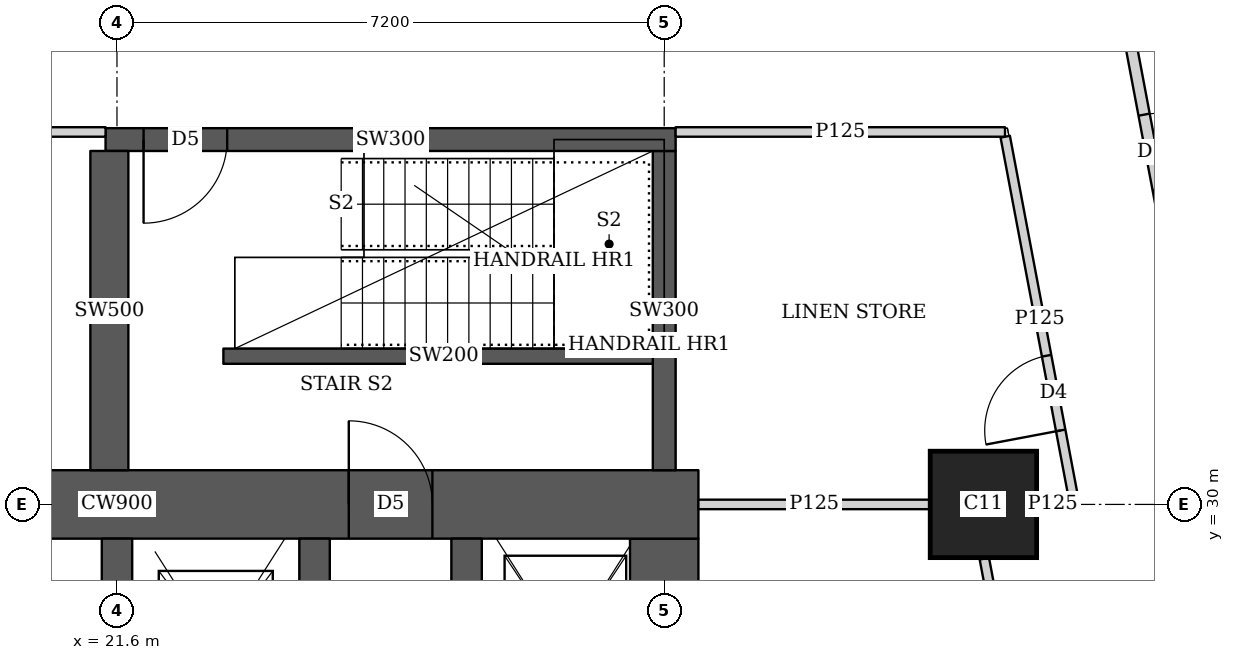
"""IFC4 building model, lengths in metres.
Left out: names, types, materials, properties, quantities, classifications, styles, units other than length and angle.
Written with IfcOpenShell. Run it as: python <this file> out.ifc"""

import sys

from ifc_helpers import new_model, si_unit, direction, frame, frame_2d, origin, origin_2d, place, context, subcontext, project, spatial, rectangle, extrude, element, fill, save


model = new_model("IFC4")
c1 = context("Model", 3, precision=1e-05, world=origin(), true_north=direction((0.0, 1.0)))
c2 = subcontext(c1, "Body", "Model", "MODEL_VIEW")
j1 = project(units=[si_unit("LENGTHUNIT", "METRE"), si_unit("PLANEANGLEUNIT", "RADIAN")], contexts=[c1])
p1 = place(None, origin())
s1 = spatial("IfcSite", under=j1, at=p1, CompositionType="ELEMENT")
p2 = place(p1, origin())
s2 = spatial("IfcBuilding", under=s1, at=p2, CompositionType="ELEMENT")
p3 = place(p2, frame((0.0, 0.0, 251.6)))
s3 = spatial("IfcBuildingStorey", under=s2, at=p3, CompositionType="ELEMENT", Elevation=251.6)
p4 = place(p3, frame((33.0, 30.0, 0.0), z_axis=(0.0, 0.0, 1.0), x_axis=(1.0, 0.0, 0.0)))
e1 = element("IfcColumn", 1, at=p4, inside=s3, PredefinedType="COLUMN", context=c2, shape_type="SweptSolid", body=[
    extrude(rectangle(XDim=1.4, YDim=1.4, at=origin_2d()), origin(), (0.0, 0.0, 1.0), 3.75),
])
p5 = place(p3, frame((13.95, 30.0, 0.0), z_axis=(0.0, 0.0, 1.0), x_axis=(1.0, 0.0, 0.0)))
e2 = element("IfcWall", 2, at=p5, inside=s3, PredefinedType="SHEAR", context=c2, shape_type="SweptSolid", body=[
    extrude(rectangle(XDim=15.3, YDim=0.9, at=frame_2d((7.65, 0.0))), origin(), (0.0, 0.0, 1.0), 3.75),
])
p6 = place(p5, frame((4.45, 0.0, 0.0)))
e3 = element("IfcOpeningElement", 3, at=p6, cuts=e2, PredefinedType="OPENING", context=c2, shape_type="SweptSolid", body=[
    extrude(rectangle(XDim=1.8, YDim=2.1, at=frame_2d((0.9, 1.05))), frame((0.0, 0.46, 0.0), z_axis=(0.0, -1.0, 0.0), x_axis=(1.0, 0.0, 0.0)), (0.0, 0.0, 1.0), 0.92),
])
p7 = place(p5, frame((10.7, 0.0, 0.0)))
e4 = element("IfcOpeningElement", 4, at=p7, cuts=e2, PredefinedType="OPENING", context=c2, shape_type="SweptSolid", body=[
    extrude(rectangle(XDim=1.1, YDim=2.1, at=frame_2d((0.55, 1.05))), frame((0.0, 0.46, 0.0), z_axis=(0.0, -1.0, 0.0), x_axis=(1.0, 0.0, 0.0)), (0.0, 0.0, 1.0), 0.92),
])
p8 = place(p3, frame((28.8, 15.45, 0.0), z_axis=(0.0, 0.0, 1.0), x_axis=(0.0, 1.0, 0.0)))
e5 = element("IfcWall", 5, at=p8, inside=s3, PredefinedType="SHEAR", context=c2, shape_type="SweptSolid", body=[
    extrude(rectangle(XDim=14.1, YDim=0.9, at=frame_2d((7.05, 0.0))), origin(), (0.0, 0.0, 1.0), 3.75),
])
p9 = place(p3, frame((21.6, 15.45, 0.0), z_axis=(0.0, 0.0, 1.0), x_axis=(0.0, 1.0, 0.0)))
e6 = element("IfcWall", 6, at=p9, inside=s3, PredefinedType="SHEAR", context=c2, shape_type="SweptSolid", body=[
    extrude(rectangle(XDim=14.1, YDim=0.4, at=frame_2d((7.05, 0.0))), origin(), (0.0, 0.0, 1.0), 3.75),
])
p10 = place(p9, frame((0.875, 0.0, 0.0)))
e7 = element("IfcOpeningElement", 7, at=p10, cuts=e6, PredefinedType="OPENING", context=c2, shape_type="SweptSolid", body=[
    extrude(rectangle(XDim=1.1, YDim=2.1, at=frame_2d((0.55, 1.05))), frame((0.0, 0.21, 0.0), z_axis=(0.0, -1.0, 0.0), x_axis=(1.0, 0.0, 0.0)), (0.0, 0.0, 1.0), 0.42),
])
p11 = place(p9, frame((4.625, 0.0, 0.0)))
e8 = element("IfcOpeningElement", 8, at=p11, cuts=e6, PredefinedType="OPENING", context=c2, shape_type="SweptSolid", body=[
    extrude(rectangle(XDim=1.1, YDim=2.1, at=frame_2d((0.55, 1.05))), frame((0.0, 0.21, 0.0), z_axis=(0.0, -1.0, 0.0), x_axis=(1.0, 0.0, 0.0)), (0.0, 0.0, 1.0), 0.42),
])
p12 = place(p9, frame((8.375, 0.0, 0.0)))
e9 = element("IfcOpeningElement", 9, at=p12, cuts=e6, PredefinedType="OPENING", context=c2, shape_type="SweptSolid", body=[
    extrude(rectangle(XDim=1.1, YDim=2.1, at=frame_2d((0.55, 1.05))), frame((0.0, 0.21, 0.0), z_axis=(0.0, -1.0, 0.0), x_axis=(1.0, 0.0, 0.0)), (0.0, 0.0, 1.0), 0.42),
])
p13 = place(p9, frame((12.125, 0.0, 0.0)))
e10 = element("IfcOpeningElement", 10, at=p13, cuts=e6, PredefinedType="OPENING", context=c2, shape_type="SweptSolid", body=[
    extrude(rectangle(XDim=1.1, YDim=2.1, at=frame_2d((0.55, 1.05))), frame((0.0, 0.21, 0.0), z_axis=(0.0, -1.0, 0.0), x_axis=(1.0, 0.0, 0.0)), (0.0, 0.0, 1.0), 0.42),
])
p14 = place(p3, frame((24.2, 15.45, 0.0), z_axis=(0.0, 0.0, 1.0), x_axis=(0.0, 1.0, 0.0)))
e11 = element("IfcWall", 11, at=p14, inside=s3, PredefinedType="SHEAR", context=c2, shape_type="SweptSolid", body=[
    extrude(rectangle(XDim=14.1, YDim=0.4, at=frame_2d((7.05, 0.0))), origin(), (0.0, 0.0, 1.0), 3.75),
])
p15 = place(p3, frame((26.2, 26.45, 0.0), z_axis=(0.0, 0.0, 1.0), x_axis=(0.0, 1.0, 0.0)))
e12 = element("IfcWall", 12, at=p15, inside=s3, PredefinedType="SHEAR", context=c2, shape_type="SweptSolid", body=[
    extrude(rectangle(XDim=3.1, YDim=0.4, at=frame_2d((1.55, 0.0))), origin(), (0.0, 0.0, 1.0), 3.75),
])
p16 = place(p15, frame((1.075, 0.0, 0.0)))
e13 = element("IfcOpeningElement", 13, at=p16, cuts=e12, PredefinedType="OPENING", context=c2, shape_type="SweptSolid", body=[
    extrude(rectangle(XDim=1.2, YDim=2.1, at=frame_2d((0.6, 1.05))), frame((0.0, 0.21, 0.0), z_axis=(0.0, -1.0, 0.0), x_axis=(1.0, 0.0, 0.0)), (0.0, 0.0, 1.0), 0.42),
])
p17 = place(p3, frame((21.45, 34.8, 0.0), z_axis=(0.0, 0.0, 1.0), x_axis=(1.0, 0.0, 0.0)))
e14 = element("IfcWall", 14, at=p17, inside=s3, PredefinedType="SHEAR", context=c2, shape_type="SweptSolid", body=[
    extrude(rectangle(XDim=7.5, YDim=0.3, at=frame_2d((3.75, 0.0))), origin(), (0.0, 0.0, 1.0), 3.75),
])
p18 = place(p17, frame((0.5, 0.0, 0.0)))
e15 = element("IfcOpeningElement", 15, at=p18, cuts=e14, PredefinedType="OPENING", context=c2, shape_type="SweptSolid", body=[
    extrude(rectangle(XDim=1.1, YDim=2.1, at=frame_2d((0.55, 1.05))), frame((0.0, 0.16, 0.0), z_axis=(0.0, -1.0, 0.0), x_axis=(1.0, 0.0, 0.0)), (0.0, 0.0, 1.0), 0.32),
])
p19 = place(p3, frame((21.5, 30.45, 0.0), z_axis=(0.0, 0.0, 1.0), x_axis=(0.0, 1.0, 0.0)))
e16 = element("IfcWall", 16, at=p19, inside=s3, PredefinedType="SHEAR", context=c2, shape_type="SweptSolid", body=[
    extrude(rectangle(XDim=4.2, YDim=0.5, at=frame_2d((2.1, 0.0))), origin(), (0.0, 0.0, 1.0), 3.75),
])
p20 = place(p3, frame((28.8, 30.45, 0.0), z_axis=(0.0, 0.0, 1.0), x_axis=(0.0, 1.0, 0.0)))
e17 = element("IfcWall", 17, at=p20, inside=s3, PredefinedType="SHEAR", context=c2, shape_type="SweptSolid", body=[
    extrude(rectangle(XDim=4.2, YDim=0.3, at=frame_2d((2.1, 0.0))), origin(), (0.0, 0.0, 1.0), 3.75),
])
p21 = place(p3, frame((33.781, 42.186, 0.0), z_axis=(0.0, 0.0, 1.0), x_axis=(0.185593518645, -0.9826266055, 0.0)))
e18 = element("IfcWall", 18, at=p21, inside=s3, PredefinedType="SOLIDWALL", context=c2, shape_type="SweptSolid", body=[
    extrude(rectangle(XDim=35.961, YDim=0.15, at=frame_2d((17.98, 0.0))), origin(), (0.0, 0.0, 1.0), 2.5),
])
p22 = place(p21, frame((7.183, 0.0, 0.0)))
e19 = element("IfcOpeningElement", 19, at=p22, cuts=e18, PredefinedType="OPENING", context=c2, shape_type="SweptSolid", body=[
    extrude(rectangle(XDim=1.0, YDim=2.1, at=frame_2d((0.5, 1.05))), frame((0.0, 0.085, 0.0), z_axis=(0.0, -1.0, 0.0), x_axis=(1.0, 0.0, 0.0)), (0.0, 0.0, 1.0), 0.17),
])
p23 = place(p21, frame((11.76, 0.0, 0.0)))
e20 = element("IfcOpeningElement", 20, at=p23, cuts=e18, PredefinedType="OPENING", context=c2, shape_type="SweptSolid", body=[
    extrude(rectangle(XDim=1.0, YDim=2.1, at=frame_2d((0.5, 1.05))), frame((0.0, 0.085, 0.0), z_axis=(0.0, -1.0, 0.0), x_axis=(1.0, 0.0, 0.0)), (0.0, 0.0, 1.0), 0.17),
])
p24 = place(p21, frame((23.863, 0.0, 0.0)))
e21 = element("IfcOpeningElement", 21, at=p24, cuts=e18, PredefinedType="OPENING", context=c2, shape_type="SweptSolid", body=[
    extrude(rectangle(XDim=1.0, YDim=2.1, at=frame_2d((0.5, 1.05))), frame((0.0, 0.085, 0.0), z_axis=(0.0, -1.0, 0.0), x_axis=(1.0, 0.0, 0.0)), (0.0, 0.0, 1.0), 0.17),
])
p25 = place(p21, frame((30.502, 0.0, 0.0)))
e22 = element("IfcOpeningElement", 22, at=p25, cuts=e18, PredefinedType="OPENING", context=c2, shape_type="SweptSolid", body=[
    extrude(rectangle(XDim=1.0, YDim=2.1, at=frame_2d((0.5, 1.05))), frame((0.0, 0.085, 0.0), z_axis=(0.0, -1.0, 0.0), x_axis=(1.0, 0.0, 0.0)), (0.0, 0.0, 1.0), 0.17),
])
p26 = place(p3, frame((13.75, 34.9, 0.0), z_axis=(0.0, 0.0, 1.0), x_axis=(1.0, 0.0, 0.0)))
e23 = element("IfcWall", 23, at=p26, inside=s3, PredefinedType="PARTITIONING", context=c2, shape_type="SweptSolid", body=[
    extrude(rectangle(XDim=7.7, YDim=0.125, at=frame_2d((3.85, 0.0))), origin(), (0.0, 0.0, 1.0), 3.5),
])
p27 = place(p26, frame((4.15, 0.0, 0.0)))
e24 = element("IfcOpeningElement", 24, at=p27, cuts=e23, PredefinedType="OPENING", context=c2, shape_type="SweptSolid", body=[
    extrude(rectangle(XDim=1.8, YDim=2.1, at=frame_2d((0.9, 1.05))), frame((0.0, 0.073, 0.0), z_axis=(0.0, -1.0, 0.0), x_axis=(1.0, 0.0, 0.0)), (0.0, 0.0, 1.0), 0.145),
])
p28 = place(p3, frame((28.95, 34.9, 0.0), z_axis=(0.0, 0.0, 1.0), x_axis=(1.0, 0.0, 0.0)))
e25 = element("IfcWall", 25, at=p28, inside=s3, PredefinedType="PARTITIONING", context=c2, shape_type="SweptSolid", body=[
    extrude(rectangle(XDim=4.334, YDim=0.125, at=frame_2d((2.167, 0.0))), origin(), (0.0, 0.0, 1.0), 3.5),
])
p29 = place(p3, frame((34.193, 30.04, 0.0), z_axis=(0.0, 0.0, 1.0), x_axis=(-0.185556349615, 0.98263362507, 0.0)))
e26 = element("IfcWall", 26, at=p29, inside=s3, PredefinedType="PARTITIONING", context=c2, shape_type="SweptSolid", body=[
    extrude(rectangle(XDim=4.883, YDim=0.125, at=frame_2d((2.441, 0.0))), origin(), (0.0, 0.0, 1.0), 2.5),
])
p30 = place(p29, frame((0.95, 0.0, 0.0)))
e27 = element("IfcOpeningElement", 27, at=p30, cuts=e26, PredefinedType="OPENING", context=c2, shape_type="SweptSolid", body=[
    extrude(rectangle(XDim=1.0, YDim=2.1, at=frame_2d((0.5, 1.05))), frame((0.0, 0.073, 0.0), z_axis=(0.0, -1.0, 0.0), x_axis=(1.0, 0.0, 0.0)), (0.0, 0.0, 1.0), 0.145),
])
p31 = place(p3, frame((34.28, 22.574, 0.0), z_axis=(0.0, 0.0, 1.0), x_axis=(-0.185610991981, 0.982623305064, 0.0)))
e28 = element("IfcWall", 28, at=p31, inside=s3, PredefinedType="PARTITIONING", context=c2, shape_type="SweptSolid", body=[
    extrude(rectangle(XDim=6.832, YDim=0.125, at=frame_2d((3.416, 0.0))), origin(), (0.0, 0.0, 1.0), 2.5),
])
p32 = place(p31, frame((3.241, 0.0, 0.0)))
e29 = element("IfcOpeningElement", 29, at=p32, cuts=e28, PredefinedType="OPENING", context=c2, shape_type="SweptSolid", body=[
    extrude(rectangle(XDim=1.0, YDim=2.1, at=frame_2d((0.5, 1.05))), frame((0.0, 0.073, 0.0), z_axis=(0.0, -1.0, 0.0), x_axis=(1.0, 0.0, 0.0)), (0.0, 0.0, 1.0), 0.145),
])
p33 = place(p3, frame((29.25, 30.0, 0.0), z_axis=(0.0, 0.0, 1.0), x_axis=(1.0, 0.0, 0.0)))
e30 = element("IfcWall", 30, at=p33, inside=s3, PredefinedType="PARTITIONING", context=c2, shape_type="SweptSolid", body=[
    extrude(rectangle(XDim=3.049, YDim=0.125, at=frame_2d((1.524, 0.0))), origin(), (0.0, 0.0, 1.0), 3.5),
])
p34 = place(p3, frame((33.701, 30.0, 0.0), z_axis=(0.0, 0.0, 1.0), x_axis=(1.0, 0.0, 0.0)))
e31 = element("IfcWall", 31, at=p34, inside=s3, PredefinedType="PARTITIONING", context=c2, shape_type="SweptSolid", body=[
    extrude(rectangle(XDim=0.424, YDim=0.125, at=frame_2d((0.212, 0.0))), origin(), (0.0, 0.0, 1.0), 2.5),
])
p35 = place(p3, frame((23.0, 31.95, 0.0), z_axis=(0.0, 0.0, 1.0), x_axis=(1.0, 0.0, 0.0)))
e32 = element("IfcWall", 32, at=p35, inside=s3, PredefinedType="SHEAR", context=c2, shape_type="SweptSolid", body=[
    extrude(rectangle(XDim=5.8, YDim=0.2, at=frame_2d((2.9, 0.0))), origin(), (0.0, 0.0, 1.0), 3.75),
])
p36 = place(p22, origin())
e33 = element("IfcDoor", 33, at=p36, inside=s3, OperationType="SINGLE_SWING_RIGHT", PredefinedType="DOOR", context=c2, shape_type="SweptSolid", body=[
    extrude(rectangle(XDim=1.0, YDim=2.1, at=frame_2d((0.5, 1.05))), frame((0.0, 0.025, 0.0), z_axis=(0.0, -1.0, 0.0), x_axis=(1.0, 0.0, 0.0)), (0.0, 0.0, 1.0), 0.05),
])
fill(e19, e33)
p37 = place(p30, origin())
e34 = element("IfcDoor", 34, at=p37, inside=s3, OperationType="SINGLE_SWING_LEFT", PredefinedType="DOOR", context=c2, shape_type="SweptSolid", body=[
    extrude(rectangle(XDim=1.0, YDim=2.1, at=frame_2d((0.5, 1.05))), frame((0.0, 0.025, 0.0), z_axis=(0.0, -1.0, 0.0), x_axis=(1.0, 0.0, 0.0)), (0.0, 0.0, 1.0), 0.05),
])
fill(e27, e34)
p38 = place(p7, origin())
e35 = element("IfcDoor", 35, at=p38, inside=s3, OperationType="SINGLE_SWING_LEFT", PredefinedType="DOOR", context=c2, shape_type="SweptSolid", body=[
    extrude(rectangle(XDim=1.1, YDim=2.1, at=frame_2d((0.55, 1.05))), frame((0.0, 0.025, 0.0), z_axis=(0.0, -1.0, 0.0), x_axis=(1.0, 0.0, 0.0)), (0.0, 0.0, 1.0), 0.05),
])
fill(e4, e35)
p39 = place(p18, origin())
e36 = element("IfcDoor", 36, at=p39, inside=s3, OperationType="SINGLE_SWING_RIGHT", PredefinedType="DOOR", context=c2, shape_type="SweptSolid", body=[
    extrude(rectangle(XDim=1.1, YDim=2.1, at=frame_2d((0.55, 1.05))), frame((0.0, 0.025, 0.0), z_axis=(0.0, -1.0, 0.0), x_axis=(1.0, 0.0, 0.0)), (0.0, 0.0, 1.0), 0.05),
])
fill(e15, e36)
save(model, sys.argv[1])
